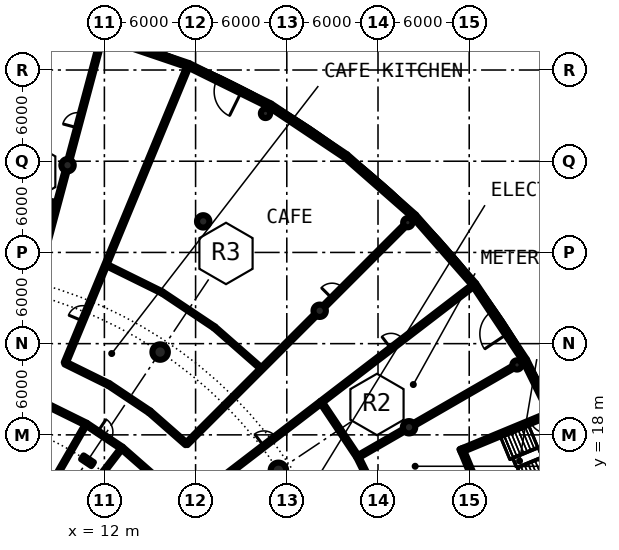
"""IFC4 building model, lengths in metres.
Left out: names, types, materials, properties, quantities, classifications, styles, units other than length and angle.
Written with IfcOpenShell. Run it as: python <this file> out.ifc"""

import sys

from ifc_helpers import new_model, si_unit, direction, frame, frame_2d, origin, origin_2d, place, context, subcontext, project, spatial, rectangle, hollow_circle, i_section, extrude, element, fill, save


model = new_model("IFC4")
c1 = context("Model", 3, precision=1e-05, world=origin(), true_north=direction((0.0, 1.0)))
c2 = subcontext(c1, "Body", "Model", "MODEL_VIEW")
j1 = project(units=[si_unit("LENGTHUNIT", "METRE"), si_unit("PLANEANGLEUNIT", "RADIAN")], contexts=[c1])
p1 = place(None, origin())
s1 = spatial("IfcSite", under=j1, at=p1, CompositionType="ELEMENT")
p2 = place(p1, origin())
s2 = spatial("IfcBuilding", under=s1, at=p2, CompositionType="ELEMENT")
p3 = place(p2, origin())
s3 = spatial("IfcBuildingStorey", under=s2, at=p3, CompositionType="ELEMENT", Elevation=0.0)
for number, where, z_axis, x_axis in (
    (1, (23.448, 15.667, -0.5), (0.0, 0.0, 1.0), (1.0, 0.0, 0.0)),
    (2, (15.667, 23.448, -0.5), (0.0, 0.0, 1.0), (1.0, 0.0, 0.0)),
):
    element("IfcColumn", number, at=place(p3, frame(where, z_axis=z_axis, x_axis=x_axis)), inside=s3, PredefinedType="COLUMN", context=c2, shape_type="SweptSolid", body=[
        extrude(hollow_circle(Radius=0.508, WallThickness=0.05, at=origin_2d()), origin(), (0.0, 0.0, 1.0), 5.9),
    ])
p4 = place(p3, frame((10.889, 16.297, -0.5), z_axis=(0.0, 0.0, 1.0), x_axis=(0.55557023302, 0.831469612303, 0.0)))
e3 = element("IfcColumn", 3, at=p4, inside=s3, PredefinedType="COLUMN", context=c2, shape_type="SweptSolid", body=[
    extrude(i_section(OverallWidth=0.303, OverallDepth=0.814, WebThickness=0.021, FlangeThickness=0.04, FilletRadius=0.03, at=origin_2d()), origin(), (0.0, 0.0, 1.0), 5.9),
])
for number, where, z_axis, x_axis in (
    (4, (32.043, 18.5, -0.5), (0.0, 0.0, 1.0), (1.0, 0.0, 0.0)),
    (5, (26.163, 26.163, -0.5), (0.0, 0.0, 1.0), (1.0, 0.0, 0.0)),
    (6, (18.5, 32.043, -0.5), (0.0, 0.0, 1.0), (1.0, 0.0, 0.0)),
    (7, (9.576, 35.739, -0.5), (0.0, 0.0, 1.0), (1.0, 0.0, 0.0)),
):
    element("IfcColumn", number, at=place(p3, frame(where, z_axis=z_axis, x_axis=x_axis)), inside=s3, PredefinedType="COLUMN", context=c2, shape_type="SweptSolid", body=[
        extrude(hollow_circle(Radius=0.406, WallThickness=0.03, at=origin_2d()), origin(), (0.0, 0.0, 1.0), 5.9),
    ])
for number, where, z_axis, x_axis in (
    (8, (39.144, 22.6, -0.5), (0.0, 0.0, 1.0), (1.0, 0.0, 0.0)),
    (9, (31.961, 31.961, -0.5), (0.0, 0.0, 1.0), (1.0, 0.0, 0.0)),
    (10, (22.6, 39.144, -0.5), (0.0, 0.0, 1.0), (1.0, 0.0, 0.0)),
):
    element("IfcColumn", number, at=place(p3, frame(where, z_axis=z_axis, x_axis=x_axis)), inside=s3, PredefinedType="COLUMN", context=c2, shape_type="SweptSolid", body=[
        extrude(hollow_circle(Radius=0.305, WallThickness=0.025, at=origin_2d()), origin(), (0.0, 0.0, 1.0), 5.9),
    ])
p5 = place(p3, frame((41.327, 19.527, 0.0), z_axis=(0.0, 0.0, 1.0), x_axis=(-0.44219447383, 0.896919197762, 0.0)))
e11 = element("IfcWall", 11, at=p5, inside=s3, PredefinedType="SOLIDWALL", context=c2, shape_type="SweptSolid", body=[
    extrude(rectangle(XDim=3.76, YDim=0.3, at=frame_2d((1.88, 0.0))), origin(), (0.0, 0.0, 1.0), 4.95),
])
p6 = place(p3, frame((39.664, 22.9, 0.0), z_axis=(0.0, 0.0, 1.0), x_axis=(-0.55554631985, 0.831485590074, 0.0)))
e12 = element("IfcWall", 12, at=p6, inside=s3, PredefinedType="SOLIDWALL", context=c2, shape_type="SweptSolid", body=[
    extrude(rectangle(XDim=5.991, YDim=0.3, at=frame_2d((2.995, 0.0))), origin(), (0.0, 0.0, 1.0), 4.95),
])
p7 = place(p6, frame((2.095, 0.0, 0.0)))
e13 = element("IfcOpeningElement", 13, at=p7, cuts=e12, PredefinedType="OPENING", context=c2, shape_type="SweptSolid", body=[
    extrude(rectangle(XDim=1.8, YDim=2.2, at=frame_2d((0.9, 1.1))), frame((0.0, 0.16, 0.0), z_axis=(0.0, -1.0, 0.0), x_axis=(1.0, 0.0, 0.0)), (0.0, 0.0, 1.0), 0.32),
])
p8 = place(p3, frame((36.336, 27.881, 0.0), z_axis=(0.0, 0.0, 1.0), x_axis=(-0.659450342916, 0.751748126189, 0.0)))
e14 = element("IfcWall", 14, at=p8, inside=s3, PredefinedType="SOLIDWALL", context=c2, shape_type="SweptSolid", body=[
    extrude(rectangle(XDim=5.991, YDim=0.3, at=frame_2d((2.996, 0.0))), origin(), (0.0, 0.0, 1.0), 4.95),
])
p9 = place(p8, frame((1.396, 0.0, 0.3)))
e15 = element("IfcOpeningElement", 15, at=p9, cuts=e14, PredefinedType="OPENING", context=c2, shape_type="SweptSolid", body=[
    extrude(rectangle(XDim=3.2, YDim=3.6, at=frame_2d((1.6, 1.8))), frame((0.0, 0.16, 0.0), z_axis=(0.0, -1.0, 0.0), x_axis=(1.0, 0.0, 0.0)), (0.0, 0.0, 1.0), 0.32),
])
p10 = place(p3, frame((32.385, 32.385, 0.0), z_axis=(0.0, 0.0, 1.0), x_axis=(-0.751748126189, 0.659450342916, 0.0)))
e16 = element("IfcWall", 16, at=p10, inside=s3, PredefinedType="SOLIDWALL", context=c2, shape_type="SweptSolid", body=[
    extrude(rectangle(XDim=5.991, YDim=0.3, at=frame_2d((2.996, 0.0))), origin(), (0.0, 0.0, 1.0), 4.95),
])
p11 = place(p10, frame((1.396, 0.0, 0.3)))
e17 = element("IfcOpeningElement", 17, at=p11, cuts=e16, PredefinedType="OPENING", context=c2, shape_type="SweptSolid", body=[
    extrude(rectangle(XDim=3.2, YDim=3.6, at=frame_2d((1.6, 1.8))), frame((0.0, 0.16, 0.0), z_axis=(0.0, -1.0, 0.0), x_axis=(1.0, 0.0, 0.0)), (0.0, 0.0, 1.0), 0.32),
])
p12 = place(p3, frame((27.881, 36.336, 0.0), z_axis=(0.0, 0.0, 1.0), x_axis=(-0.831485590074, 0.55554631985, 0.0)))
e18 = element("IfcWall", 18, at=p12, inside=s3, PredefinedType="SOLIDWALL", context=c2, shape_type="SweptSolid", body=[
    extrude(rectangle(XDim=5.991, YDim=0.3, at=frame_2d((2.995, 0.0))), origin(), (0.0, 0.0, 1.0), 4.95),
])
p13 = place(p12, frame((1.396, 0.0, 0.3)))
e19 = element("IfcOpeningElement", 19, at=p13, cuts=e18, PredefinedType="OPENING", context=c2, shape_type="SweptSolid", body=[
    extrude(rectangle(XDim=3.2, YDim=3.6, at=frame_2d((1.6, 1.8))), frame((0.0, 0.16, 0.0), z_axis=(0.0, -1.0, 0.0), x_axis=(1.0, 0.0, 0.0)), (0.0, 0.0, 1.0), 0.32),
])
p14 = place(p3, frame((22.9, 39.664, 0.0), z_axis=(0.0, 0.0, 1.0), x_axis=(-0.896850939151, 0.44233289833, 0.0)))
e20 = element("IfcWall", 20, at=p14, inside=s3, PredefinedType="SOLIDWALL", context=c2, shape_type="SweptSolid", body=[
    extrude(rectangle(XDim=5.991, YDim=0.3, at=frame_2d((2.995, 0.0))), origin(), (0.0, 0.0, 1.0), 4.95),
])
p15 = place(p14, frame((2.095, 0.0, 0.0)))
e21 = element("IfcOpeningElement", 21, at=p15, cuts=e20, PredefinedType="OPENING", context=c2, shape_type="SweptSolid", body=[
    extrude(rectangle(XDim=1.8, YDim=2.2, at=frame_2d((0.9, 1.1))), frame((0.0, 0.16, 0.0), z_axis=(0.0, -1.0, 0.0), x_axis=(1.0, 0.0, 0.0)), (0.0, 0.0, 1.0), 0.32),
])
p16 = place(p3, frame((17.527, 42.314, 0.0), z_axis=(0.0, 0.0, 1.0), x_axis=(-0.946966078776, 0.321333542675, 0.0)))
e22 = element("IfcWall", 22, at=p16, inside=s3, PredefinedType="SOLIDWALL", context=c2, shape_type="SweptSolid", body=[
    extrude(rectangle(XDim=5.991, YDim=0.3, at=frame_2d((2.995, 0.0))), origin(), (0.0, 0.0, 1.0), 4.95),
])
p17 = place(p16, frame((1.396, 0.0, 0.3)))
e23 = element("IfcOpeningElement", 23, at=p17, cuts=e22, PredefinedType="OPENING", context=c2, shape_type="SweptSolid", body=[
    extrude(rectangle(XDim=3.2, YDim=3.6, at=frame_2d((1.6, 1.8))), frame((0.0, 0.16, 0.0), z_axis=(0.0, -1.0, 0.0), x_axis=(1.0, 0.0, 0.0)), (0.0, 0.0, 1.0), 0.32),
])
p18 = place(p3, frame((41.372, 19.41, 0.0), z_axis=(0.0, 0.0, 1.0), x_axis=(-0.923886743203, -0.382666023753, 0.0)))
e24 = element("IfcWall", 24, at=p18, inside=s3, PredefinedType="SHEAR", context=c2, shape_type="SweptSolid", body=[
    extrude(rectangle(XDim=6.45, YDim=0.25, at=frame_2d((3.225, 0.0))), origin(), (0.0, 0.0, 1.0), 5.4),
])
p19 = place(p18, frame((0.25, 0.0, 0.0)))
e25 = element("IfcOpeningElement", 25, at=p19, cuts=e24, PredefinedType="OPENING", context=c2, shape_type="SweptSolid", body=[
    extrude(rectangle(XDim=1.2, YDim=2.3, at=frame_2d((0.6, 1.15))), frame((0.0, 0.135, 0.0), z_axis=(0.0, -1.0, 0.0), x_axis=(1.0, 0.0, 0.0)), (0.0, 0.0, 1.0), 0.27),
])
p20 = place(p3, frame((37.183, 12.993, 0.0), z_axis=(0.0, 0.0, 1.0), x_axis=(-0.382713570591, 0.923867048273, 0.0)))
e26 = element("IfcWall", 26, at=p20, inside=s3, PredefinedType="SHEAR", context=c2, shape_type="SweptSolid", body=[
    extrude(rectangle(XDim=4.45, YDim=0.25, at=frame_2d((2.225, 0.0))), origin(), (0.0, 0.0, 1.0), 5.4),
])
p21 = place(p3, frame((5.35, 9.266, 0.0), z_axis=(0.0, 0.0, 1.0), x_axis=(0.499986132754, 0.866033409894, 0.0)))
e27 = element("IfcWall", 27, at=p21, inside=s3, PredefinedType="PARTITIONING", context=c2, shape_type="SweptSolid", body=[
    extrude(rectangle(XDim=10.9, YDim=0.15, at=frame_2d((5.45, 0.0))), origin(), (0.0, 0.0, 1.0), 4.95),
])
p22 = place(p3, frame((6.367, 23.762, 0.0), z_axis=(0.0, 0.0, 1.0), x_axis=(0.258829982463, 0.965922895566, 0.0)))
e28 = element("IfcWall", 28, at=p22, inside=s3, PredefinedType="PARTITIONING", context=c2, shape_type="SweptSolid", body=[
    extrude(rectangle(XDim=12.0, YDim=0.2, at=frame_2d((6.0, 0.0))), origin(), (0.0, 0.0, 1.0), 4.95),
])
p23 = place(p3, frame((9.418, 22.726, 0.0), z_axis=(0.0, 0.0, 1.0), x_axis=(0.382752037664, 0.923851112282, 0.0)))
e29 = element("IfcWall", 29, at=p23, inside=s3, PredefinedType="PARTITIONING", context=c2, shape_type="SweptSolid", body=[
    extrude(rectangle(XDim=21.1, YDim=0.2, at=frame_2d((10.55, 0.0))), origin(), (0.0, 0.0, 1.0), 4.95),
])
p24 = place(p23, frame((3.0, 0.0, 0.0)))
e30 = element("IfcOpeningElement", 30, at=p24, cuts=e29, PredefinedType="OPENING", context=c2, shape_type="SweptSolid", body=[
    extrude(rectangle(XDim=1.0, YDim=2.3, at=frame_2d((0.5, 1.15))), frame((0.0, 0.11, 0.0), z_axis=(0.0, -1.0, 0.0), x_axis=(1.0, 0.0, 0.0)), (0.0, 0.0, 1.0), 0.22),
])
p25 = place(p3, frame((9.68, 36.125, 0.0), z_axis=(0.0, 0.0, 1.0), x_axis=(0.25879899448, 0.965931198614, 0.0)))
e31 = element("IfcWall", 31, at=p25, inside=s3, PredefinedType="PARTITIONING", context=c2, shape_type="SweptSolid", body=[
    extrude(rectangle(XDim=7.501, YDim=0.2, at=frame_2d((3.75, 0.0))), origin(), (0.0, 0.0, 1.0), 4.95),
])
p26 = place(p25, frame((2.144, 0.0, 0.0)))
e32 = element("IfcOpeningElement", 32, at=p26, cuts=e31, PredefinedType="OPENING", context=c2, shape_type="SweptSolid", body=[
    extrude(rectangle(XDim=1.0, YDim=2.3, at=frame_2d((0.5, 1.15))), frame((0.0, 0.11, 0.0), z_axis=(0.0, -1.0, 0.0), x_axis=(1.0, 0.0, 0.0)), (0.0, 0.0, 1.0), 0.22),
])
p27 = place(p3, frame((9.801, 12.773, 0.0), z_axis=(0.0, 0.0, 1.0), x_axis=(0.608764206331, 0.793351209169, 0.0)))
e33 = element("IfcWall", 33, at=p27, inside=s3, PredefinedType="PARTITIONING", context=c2, shape_type="SweptSolid", body=[
    extrude(rectangle(XDim=5.5, YDim=0.15, at=frame_2d((2.75, 0.0))), origin(), (0.0, 0.0, 1.0), 4.95),
])
p28 = place(p3, frame((17.395, 17.395, 0.0), z_axis=(0.0, 0.0, 1.0), x_axis=(0.707106781187, 0.707106781187, 0.0)))
e34 = element("IfcWall", 34, at=p28, inside=s3, PredefinedType="PARTITIONING", context=c2, shape_type="SweptSolid", body=[
    extrude(rectangle(XDim=11.994, YDim=0.2, at=frame_2d((5.997, 0.0))), origin(), (0.0, 0.0, 1.0), 4.95),
])
p29 = place(p3, frame((19.516, 14.976, 0.0), z_axis=(0.0, 0.0, 1.0), x_axis=(0.793407068843, 0.608691402198, 0.0)))
e35 = element("IfcWall", 35, at=p29, inside=s3, PredefinedType="PARTITIONING", context=c2, shape_type="SweptSolid", body=[
    extrude(rectangle(XDim=8.5, YDim=0.2, at=frame_2d((4.25, 0.0))), origin(), (0.0, 0.0, 1.0), 4.95),
])
p30 = place(p29, frame((3.75, 0.0, 0.0)))
e36 = element("IfcOpeningElement", 36, at=p30, cuts=e35, PredefinedType="OPENING", context=c2, shape_type="SweptSolid", body=[
    extrude(rectangle(XDim=1.0, YDim=2.3, at=frame_2d((0.5, 1.15))), frame((0.0, 0.11, 0.0), z_axis=(0.0, -1.0, 0.0), x_axis=(1.0, 0.0, 0.0)), (0.0, 0.0, 1.0), 0.22),
])
p31 = place(p3, frame((26.26, 20.15, 0.0), z_axis=(0.0, 0.0, 1.0), x_axis=(0.793363129336, 0.608748671465, 0.0)))
e37 = element("IfcWall", 37, at=p31, inside=s3, PredefinedType="PARTITIONING", context=c2, shape_type="SweptSolid", body=[
    extrude(rectangle(XDim=12.588, YDim=0.2, at=frame_2d((6.294, 0.0))), origin(), (0.0, 0.0, 1.0), 4.95),
])
p32 = place(p31, frame((5.794, 0.0, 0.0)))
e38 = element("IfcOpeningElement", 38, at=p32, cuts=e37, PredefinedType="OPENING", context=c2, shape_type="SweptSolid", body=[
    extrude(rectangle(XDim=1.0, YDim=2.3, at=frame_2d((0.5, 1.15))), frame((0.0, 0.11, 0.0), z_axis=(0.0, -1.0, 0.0), x_axis=(1.0, 0.0, 0.0)), (0.0, 0.0, 1.0), 0.22),
])
p33 = place(p3, frame((26.45, 26.45, 0.0), z_axis=(0.0, 0.0, 1.0), x_axis=(0.707106781187, 0.707106781187, 0.0)))
e39 = element("IfcWall", 39, at=p33, inside=s3, PredefinedType="PARTITIONING", context=c2, shape_type="SweptSolid", body=[
    extrude(rectangle(XDim=7.49, YDim=0.2, at=frame_2d((3.745, 0.0))), origin(), (0.0, 0.0, 1.0), 4.95),
])
p34 = place(p33, frame((0.745, 0.0, 0.0)))
e40 = element("IfcOpeningElement", 40, at=p34, cuts=e39, PredefinedType="OPENING", context=c2, shape_type="SweptSolid", body=[
    extrude(rectangle(XDim=1.0, YDim=2.3, at=frame_2d((0.5, 1.15))), frame((0.0, 0.11, 0.0), z_axis=(0.0, -1.0, 0.0), x_axis=(1.0, 0.0, 0.0)), (0.0, 0.0, 1.0), 0.22),
])
p35 = place(p3, frame((28.665, 16.55, 0.0), z_axis=(0.0, 0.0, 1.0), x_axis=(0.86608920467, 0.499889477339, 0.0)))
e41 = element("IfcWall", 41, at=p35, inside=s3, PredefinedType="PARTITIONING", context=c2, shape_type="SweptSolid", body=[
    extrude(rectangle(XDim=3.501, YDim=0.2, at=frame_2d((1.75, 0.0))), origin(), (0.0, 0.0, 1.0), 4.95),
])
p36 = place(p3, frame((32.389, 18.7, 0.0), z_axis=(0.0, 0.0, 1.0), x_axis=(0.866055506462, 0.499947857008, 0.0)))
e42 = element("IfcWall", 42, at=p36, inside=s3, PredefinedType="PARTITIONING", context=c2, shape_type="SweptSolid", body=[
    extrude(rectangle(XDim=7.501, YDim=0.2, at=frame_2d((3.75, 0.0))), origin(), (0.0, 0.0, 1.0), 4.95),
])
p37 = place(p3, frame((8.266, 19.956, 0.0), z_axis=(0.0, 0.0, 1.0), x_axis=(0.896816398134, -0.442402924988, 0.0)))
e43 = element("IfcWall", 43, at=p37, inside=s3, PredefinedType="PARTITIONING", context=c2, shape_type="SweptSolid", body=[
    extrude(rectangle(XDim=2.825, YDim=0.2, at=frame_2d((1.413, 0.0))), origin(), (0.0, 0.0, 1.0), 4.95),
])
p38 = place(p3, frame((10.8, 18.706, 0.0), z_axis=(0.0, 0.0, 1.0), x_axis=(0.831371669473, -0.55571678686, 0.0)))
e44 = element("IfcWall", 44, at=p38, inside=s3, PredefinedType="PARTITIONING", context=c2, shape_type="SweptSolid", body=[
    extrude(rectangle(XDim=2.825, YDim=0.2, at=frame_2d((1.413, 0.0))), origin(), (0.0, 0.0, 1.0), 4.95),
])
p39 = place(p38, frame((0.913, 0.0, 0.0)))
e45 = element("IfcOpeningElement", 45, at=p39, cuts=e44, PredefinedType="OPENING", context=c2, shape_type="SweptSolid", body=[
    extrude(rectangle(XDim=1.0, YDim=2.3, at=frame_2d((0.5, 1.15))), frame((0.0, 0.11, 0.0), z_axis=(0.0, -1.0, 0.0), x_axis=(1.0, 0.0, 0.0)), (0.0, 0.0, 1.0), 0.22),
])
p40 = place(p3, frame((13.149, 17.136, 0.0), z_axis=(0.0, 0.0, 1.0), x_axis=(0.752105457459, -0.659042776199, 0.0)))
e46 = element("IfcWall", 46, at=p40, inside=s3, PredefinedType="PARTITIONING", context=c2, shape_type="SweptSolid", body=[
    extrude(rectangle(XDim=2.825, YDim=0.2, at=frame_2d((1.413, 0.0))), origin(), (0.0, 0.0, 1.0), 4.95),
])
p41 = place(p3, frame((9.414, 22.727, 0.0), z_axis=(0.0, 0.0, 1.0), x_axis=(0.896886949195, -0.442259878763, 0.0)))
e47 = element("IfcWall", 47, at=p41, inside=s3, PredefinedType="PARTITIONING", context=c2, shape_type="SweptSolid", body=[
    extrude(rectangle(XDim=3.218, YDim=0.2, at=frame_2d((1.609, 0.0))), origin(), (0.0, 0.0, 1.0), 4.95),
])
p42 = place(p3, frame((12.3, 21.304, 0.0), z_axis=(0.0, 0.0, 1.0), x_axis=(0.831501361433, -0.555522714148, 0.0)))
e48 = element("IfcWall", 48, at=p42, inside=s3, PredefinedType="PARTITIONING", context=c2, shape_type="SweptSolid", body=[
    extrude(rectangle(XDim=3.218, YDim=0.2, at=frame_2d((1.609, 0.0))), origin(), (0.0, 0.0, 1.0), 4.95),
])
p43 = place(p3, frame((14.976, 19.516, 0.0), z_axis=(0.0, 0.0, 1.0), x_axis=(0.751880539175, -0.659299366608, 0.0)))
e49 = element("IfcWall", 49, at=p43, inside=s3, PredefinedType="PARTITIONING", context=c2, shape_type="SweptSolid", body=[
    extrude(rectangle(XDim=3.217, YDim=0.2, at=frame_2d((1.609, 0.0))), origin(), (0.0, 0.0, 1.0), 4.95),
])
p44 = place(p3, frame((12.093, 29.195, 0.0), z_axis=(0.0, 0.0, 1.0), x_axis=(0.896777137886, -0.44248250244, 0.0)))
e50 = element("IfcWall", 50, at=p44, inside=s3, PredefinedType="PARTITIONING", context=c2, shape_type="SweptSolid", body=[
    extrude(rectangle(XDim=4.134, YDim=0.15, at=frame_2d((2.067, 0.0))), origin(), (0.0, 0.0, 1.0), 4.95),
])
p45 = place(p3, frame((15.8, 27.366, 0.0), z_axis=(0.0, 0.0, 1.0), x_axis=(0.831541061826, -0.555463286363, 0.0)))
e51 = element("IfcWall", 51, at=p45, inside=s3, PredefinedType="PARTITIONING", context=c2, shape_type="SweptSolid", body=[
    extrude(rectangle(XDim=4.133, YDim=0.15, at=frame_2d((2.067, 0.0))), origin(), (0.0, 0.0, 1.0), 4.95),
])
p46 = place(p3, frame((19.237, 25.07, 0.0), z_axis=(0.0, 0.0, 1.0), x_axis=(0.751895740099, -0.659282030713, 0.0)))
e52 = element("IfcWall", 52, at=p46, inside=s3, PredefinedType="PARTITIONING", context=c2, shape_type="SweptSolid", body=[
    extrude(rectangle(XDim=4.134, YDim=0.15, at=frame_2d((2.067, 0.0))), origin(), (0.0, 0.0, 1.0), 4.95),
])
p47 = place(p3, frame((26.26, 20.15, 0.0), z_axis=(0.0, 0.0, 1.0), x_axis=(0.555519783102, -0.831503319646, 0.0)))
e53 = element("IfcWall", 53, at=p47, inside=s3, PredefinedType="PARTITIONING", context=c2, shape_type="SweptSolid", body=[
    extrude(rectangle(XDim=4.329, YDim=0.2, at=frame_2d((2.165, 0.0))), origin(), (0.0, 0.0, 1.0), 4.95),
])
p48 = place(p3, frame((28.665, 16.55, 0.0), z_axis=(0.0, 0.0, 1.0), x_axis=(0.442312366853, -0.89686106512, 0.0)))
e54 = element("IfcWall", 54, at=p48, inside=s3, PredefinedType="PARTITIONING", context=c2, shape_type="SweptSolid", body=[
    extrude(rectangle(XDim=4.33, YDim=0.2, at=frame_2d((2.165, 0.0))), origin(), (0.0, 0.0, 1.0), 4.95),
])
p49 = place(p3, frame((4.49, 34.106, 0.0), z_axis=(0.0, 0.0, 1.0), x_axis=(0.980780503919, -0.195114333486, 0.0)))
e55 = element("IfcWall", 55, at=p49, inside=s3, PredefinedType="PARTITIONING", context=c2, shape_type="SweptSolid", body=[
    extrude(rectangle(XDim=4.5, YDim=0.15, at=frame_2d((2.25, 0.0))), origin(), (0.0, 0.0, 1.0), 4.95),
])
p50 = place(p7, origin())
e56 = element("IfcDoor", 56, at=p50, inside=s3, OperationType="SINGLE_SWING_LEFT", PredefinedType="DOOR", context=c2, shape_type="SweptSolid", body=[
    extrude(rectangle(XDim=1.8, YDim=2.2, at=frame_2d((0.9, 1.1))), frame((0.0, 0.025, 0.0), z_axis=(0.0, -1.0, 0.0), x_axis=(1.0, 0.0, 0.0)), (0.0, 0.0, 1.0), 0.05),
])
fill(e13, e56)
p51 = place(p9, origin())
e57 = element("IfcWindow", 57, at=p51, inside=s3, PartitioningType="SINGLE_PANEL", PredefinedType="WINDOW", context=c2, shape_type="SweptSolid", body=[
    extrude(rectangle(XDim=3.2, YDim=3.6, at=frame_2d((1.6, 1.8))), frame((0.0, 0.03, 0.0), z_axis=(0.0, -1.0, 0.0), x_axis=(1.0, 0.0, 0.0)), (0.0, 0.0, 1.0), 0.06),
])
fill(e15, e57)
p52 = place(p11, origin())
e58 = element("IfcWindow", 58, at=p52, inside=s3, PartitioningType="SINGLE_PANEL", PredefinedType="WINDOW", context=c2, shape_type="SweptSolid", body=[
    extrude(rectangle(XDim=3.2, YDim=3.6, at=frame_2d((1.6, 1.8))), frame((0.0, 0.03, 0.0), z_axis=(0.0, -1.0, 0.0), x_axis=(1.0, 0.0, 0.0)), (0.0, 0.0, 1.0), 0.06),
])
fill(e17, e58)
p53 = place(p13, origin())
e59 = element("IfcWindow", 59, at=p53, inside=s3, PartitioningType="SINGLE_PANEL", PredefinedType="WINDOW", context=c2, shape_type="SweptSolid", body=[
    extrude(rectangle(XDim=3.2, YDim=3.6, at=frame_2d((1.6, 1.8))), frame((0.0, 0.03, 0.0), z_axis=(0.0, -1.0, 0.0), x_axis=(1.0, 0.0, 0.0)), (0.0, 0.0, 1.0), 0.06),
])
fill(e19, e59)
p54 = place(p15, origin())
e60 = element("IfcDoor", 60, at=p54, inside=s3, OperationType="SINGLE_SWING_LEFT", PredefinedType="DOOR", context=c2, shape_type="SweptSolid", body=[
    extrude(rectangle(XDim=1.8, YDim=2.2, at=frame_2d((0.9, 1.1))), frame((0.0, 0.025, 0.0), z_axis=(0.0, -1.0, 0.0), x_axis=(1.0, 0.0, 0.0)), (0.0, 0.0, 1.0), 0.05),
])
fill(e21, e60)
p55 = place(p17, origin())
e61 = element("IfcWindow", 61, at=p55, inside=s3, PartitioningType="SINGLE_PANEL", PredefinedType="WINDOW", context=c2, shape_type="SweptSolid", body=[
    extrude(rectangle(XDim=3.2, YDim=3.6, at=frame_2d((1.6, 1.8))), frame((0.0, 0.03, 0.0), z_axis=(0.0, -1.0, 0.0), x_axis=(1.0, 0.0, 0.0)), (0.0, 0.0, 1.0), 0.06),
])
fill(e23, e61)
p56 = place(p19, origin())
e62 = element("IfcDoor", 62, at=p56, inside=s3, OperationType="SINGLE_SWING_RIGHT", PredefinedType="DOOR", context=c2, shape_type="SweptSolid", body=[
    extrude(rectangle(XDim=1.2, YDim=2.3, at=frame_2d((0.6, 1.15))), frame((0.0, 0.025, 0.0), z_axis=(0.0, -1.0, 0.0), x_axis=(1.0, 0.0, 0.0)), (0.0, 0.0, 1.0), 0.05),
])
fill(e25, e62)
p57 = place(p39, origin())
e63 = element("IfcDoor", 63, at=p57, inside=s3, OperationType="SINGLE_SWING_LEFT", PredefinedType="DOOR", context=c2, shape_type="SweptSolid", body=[
    extrude(rectangle(XDim=1.0, YDim=2.3, at=frame_2d((0.5, 1.15))), frame((0.0, 0.025, 0.0), z_axis=(0.0, -1.0, 0.0), x_axis=(1.0, 0.0, 0.0)), (0.0, 0.0, 1.0), 0.05),
])
fill(e45, e63)
p58 = place(p30, origin())
e64 = element("IfcDoor", 64, at=p58, inside=s3, OperationType="SINGLE_SWING_RIGHT", PredefinedType="DOOR", context=c2, shape_type="SweptSolid", body=[
    extrude(rectangle(XDim=1.0, YDim=2.3, at=frame_2d((0.5, 1.15))), frame((0.0, 0.025, 0.0), z_axis=(0.0, -1.0, 0.0), x_axis=(1.0, 0.0, 0.0)), (0.0, 0.0, 1.0), 0.05),
])
fill(e36, e64)
p59 = place(p32, origin())
e65 = element("IfcDoor", 65, at=p59, inside=s3, OperationType="SINGLE_SWING_RIGHT", PredefinedType="DOOR", context=c2, shape_type="SweptSolid", body=[
    extrude(rectangle(XDim=1.0, YDim=2.3, at=frame_2d((0.5, 1.15))), frame((0.0, 0.025, 0.0), z_axis=(0.0, -1.0, 0.0), x_axis=(1.0, 0.0, 0.0)), (0.0, 0.0, 1.0), 0.05),
])
fill(e38, e65)
p60 = place(p24, origin())
e66 = element("IfcDoor", 66, at=p60, inside=s3, OperationType="SINGLE_SWING_LEFT", PredefinedType="DOOR", context=c2, shape_type="SweptSolid", body=[
    extrude(rectangle(XDim=1.0, YDim=2.3, at=frame_2d((0.5, 1.15))), frame((0.0, 0.025, 0.0), z_axis=(0.0, -1.0, 0.0), x_axis=(1.0, 0.0, 0.0)), (0.0, 0.0, 1.0), 0.05),
])
fill(e30, e66)
p61 = place(p34, origin())
e67 = element("IfcDoor", 67, at=p61, inside=s3, OperationType="SINGLE_SWING_LEFT", PredefinedType="DOOR", context=c2, shape_type="SweptSolid", body=[
    extrude(rectangle(XDim=1.0, YDim=2.3, at=frame_2d((0.5, 1.15))), frame((0.0, 0.025, 0.0), z_axis=(0.0, -1.0, 0.0), x_axis=(1.0, 0.0, 0.0)), (0.0, 0.0, 1.0), 0.05),
])
fill(e40, e67)
p62 = place(p26, origin())
e68 = element("IfcDoor", 68, at=p62, inside=s3, OperationType="SINGLE_SWING_LEFT", PredefinedType="DOOR", context=c2, shape_type="SweptSolid", body=[
    extrude(rectangle(XDim=1.0, YDim=2.3, at=frame_2d((0.5, 1.15))), frame((0.0, 0.025, 0.0), z_axis=(0.0, -1.0, 0.0), x_axis=(1.0, 0.0, 0.0)), (0.0, 0.0, 1.0), 0.05),
])
fill(e32, e68)
save(model, sys.argv[1])
